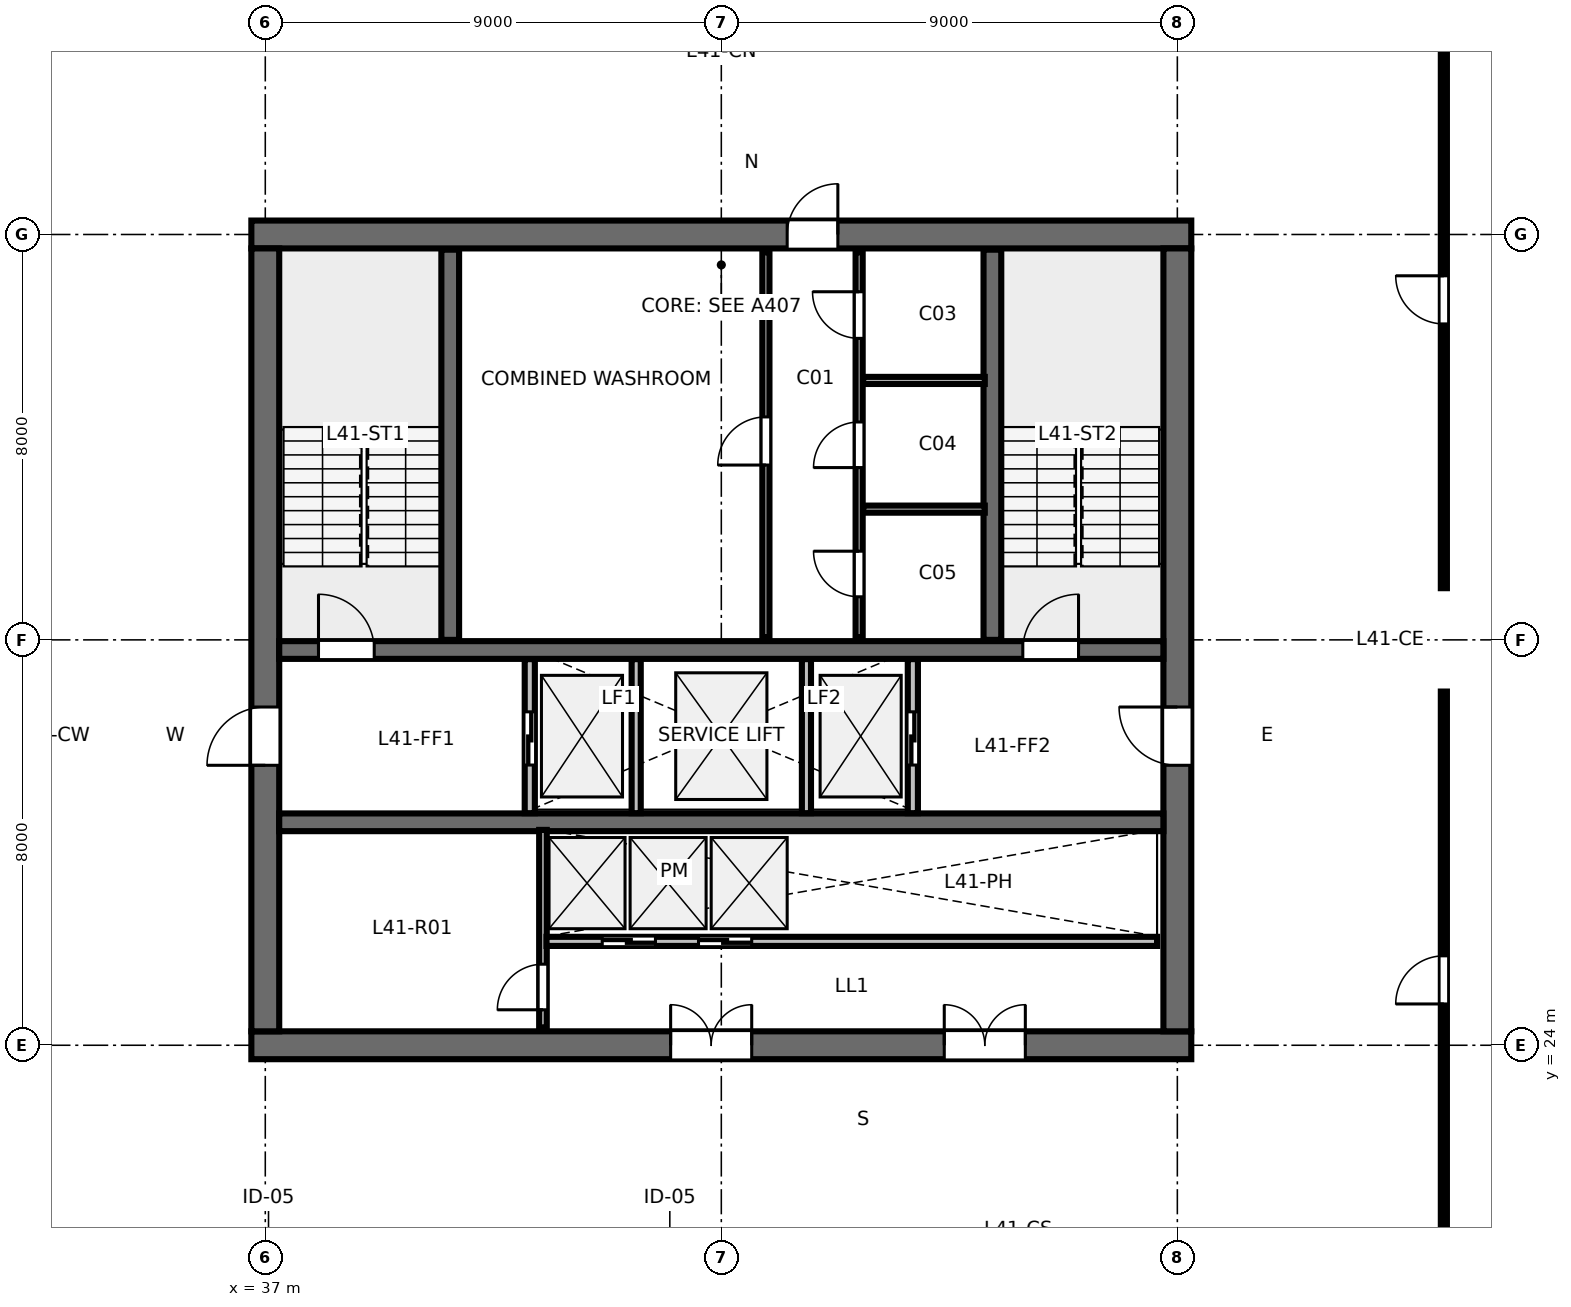
"""IFC4 building model, lengths in metres.
Left out: names, types, materials, properties, quantities, classifications, styles, units other than length and angle.
Written with IfcOpenShell. Run it as: python <this file> out.ifc"""

import sys

from ifc_helpers import new_model, si_unit, direction, frame, frame_2d, origin, place, context, subcontext, project, spatial, rectangle, extrude, element, fill, save


model = new_model("IFC4")
c1 = context("Model", 3, precision=1e-05, world=origin(), true_north=direction((0.0, 1.0)))
c2 = subcontext(c1, "Body", "Model", "MODEL_VIEW")
j1 = project(units=[si_unit("LENGTHUNIT", "METRE"), si_unit("PLANEANGLEUNIT", "RADIAN")], contexts=[c1])
p1 = place(None, origin())
s1 = spatial("IfcSite", under=j1, at=p1, CompositionType="ELEMENT")
p2 = place(p1, origin())
s2 = spatial("IfcBuilding", under=s1, at=p2, CompositionType="ELEMENT")
p3 = place(p2, frame((0.0, 0.0, 156.4)))
s3 = spatial("IfcBuildingStorey", under=s2, at=p3, CompositionType="ELEMENT", Elevation=156.4)
p4 = place(p3, frame((36.725, 24.0, 0.0), z_axis=(0.0, 0.0, 1.0), x_axis=(1.0, 0.0, 0.0)))
e1 = element("IfcWall", 1, at=p4, inside=s3, PredefinedType="SHEAR", context=c2, shape_type="SweptSolid", body=[
    extrude(rectangle(XDim=18.55, YDim=0.55, at=frame_2d((9.275, 0.0))), origin(), (0.0, 0.0, 1.0), 3.36),
])
p5 = place(p4, frame((8.275, 0.0, 0.0)))
e2 = element("IfcOpeningElement", 2, at=p5, cuts=e1, PredefinedType="OPENING", context=c2, shape_type="SweptSolid", body=[
    extrude(rectangle(XDim=1.6, YDim=2.15, at=frame_2d((0.8, 1.075))), frame((0.0, 0.285, 0.0), z_axis=(0.0, -1.0, 0.0), x_axis=(1.0, 0.0, 0.0)), (0.0, 0.0, 1.0), 0.57),
])
p6 = place(p4, frame((13.675, 0.0, 0.0)))
e3 = element("IfcOpeningElement", 3, at=p6, cuts=e1, PredefinedType="OPENING", context=c2, shape_type="SweptSolid", body=[
    extrude(rectangle(XDim=1.6, YDim=2.15, at=frame_2d((0.8, 1.075))), frame((0.0, 0.285, 0.0), z_axis=(0.0, -1.0, 0.0), x_axis=(1.0, 0.0, 0.0)), (0.0, 0.0, 1.0), 0.57),
])
p7 = place(p3, frame((36.725, 40.0, 0.0), z_axis=(0.0, 0.0, 1.0), x_axis=(1.0, 0.0, 0.0)))
e4 = element("IfcWall", 4, at=p7, inside=s3, PredefinedType="SHEAR", context=c2, shape_type="SweptSolid", body=[
    extrude(rectangle(XDim=18.55, YDim=0.55, at=frame_2d((9.275, 0.0))), origin(), (0.0, 0.0, 1.0), 3.36),
])
p8 = place(p7, frame((10.575, 0.0, 0.0)))
e5 = element("IfcOpeningElement", 5, at=p8, cuts=e4, PredefinedType="OPENING", context=c2, shape_type="SweptSolid", body=[
    extrude(rectangle(XDim=1.0, YDim=2.15, at=frame_2d((0.5, 1.075))), frame((0.0, 0.285, 0.0), z_axis=(0.0, -1.0, 0.0), x_axis=(1.0, 0.0, 0.0)), (0.0, 0.0, 1.0), 0.57),
])
p9 = place(p3, frame((37.0, 24.275, 0.0), z_axis=(0.0, 0.0, 1.0), x_axis=(0.0, 1.0, 0.0)))
e6 = element("IfcWall", 6, at=p9, inside=s3, PredefinedType="SHEAR", context=c2, shape_type="SweptSolid", body=[
    extrude(rectangle(XDim=15.45, YDim=0.55, at=frame_2d((7.725, 0.0))), origin(), (0.0, 0.0, 1.0), 3.36),
])
p10 = place(p9, frame((5.25, 0.0, 0.0)))
e7 = element("IfcOpeningElement", 7, at=p10, cuts=e6, PredefinedType="OPENING", context=c2, shape_type="SweptSolid", body=[
    extrude(rectangle(XDim=1.15, YDim=2.15, at=frame_2d((0.575, 1.075))), frame((0.0, 0.285, 0.0), z_axis=(0.0, -1.0, 0.0), x_axis=(1.0, 0.0, 0.0)), (0.0, 0.0, 1.0), 0.57),
])
p11 = place(p3, frame((55.0, 24.275, 0.0), z_axis=(0.0, 0.0, 1.0), x_axis=(0.0, 1.0, 0.0)))
e8 = element("IfcWall", 8, at=p11, inside=s3, PredefinedType="SHEAR", context=c2, shape_type="SweptSolid", body=[
    extrude(rectangle(XDim=15.45, YDim=0.55, at=frame_2d((7.725, 0.0))), origin(), (0.0, 0.0, 1.0), 3.36),
])
p12 = place(p11, frame((5.25, 0.0, 0.0)))
e9 = element("IfcOpeningElement", 9, at=p12, cuts=e8, PredefinedType="OPENING", context=c2, shape_type="SweptSolid", body=[
    extrude(rectangle(XDim=1.15, YDim=2.15, at=frame_2d((0.575, 1.075))), frame((0.0, 0.285, 0.0), z_axis=(0.0, -1.0, 0.0), x_axis=(1.0, 0.0, 0.0)), (0.0, 0.0, 1.0), 0.57),
])
p13 = place(p3, frame((37.275, 31.8, 0.0), z_axis=(0.0, 0.0, 1.0), x_axis=(1.0, 0.0, 0.0)))
e10 = element("IfcWall", 10, at=p13, inside=s3, PredefinedType="SHEAR", context=c2, shape_type="SweptSolid", body=[
    extrude(rectangle(XDim=17.45, YDim=0.35, at=frame_2d((8.725, 0.0))), origin(), (0.0, 0.0, 1.0), 3.36),
])
p14 = place(p13, frame((0.775, 0.0, 0.0)))
e11 = element("IfcOpeningElement", 11, at=p14, cuts=e10, PredefinedType="OPENING", context=c2, shape_type="SweptSolid", body=[
    extrude(rectangle(XDim=1.1, YDim=2.15, at=frame_2d((0.55, 1.075))), frame((0.0, 0.185, 0.0), z_axis=(0.0, -1.0, 0.0), x_axis=(1.0, 0.0, 0.0)), (0.0, 0.0, 1.0), 0.37),
])
p15 = place(p13, frame((14.675, 0.0, 0.0)))
e12 = element("IfcOpeningElement", 12, at=p15, cuts=e10, PredefinedType="OPENING", context=c2, shape_type="SweptSolid", body=[
    extrude(rectangle(XDim=1.1, YDim=2.15, at=frame_2d((0.55, 1.075))), frame((0.0, 0.185, 0.0), z_axis=(0.0, -1.0, 0.0), x_axis=(1.0, 0.0, 0.0)), (0.0, 0.0, 1.0), 0.37),
])
p16 = place(p3, frame((37.275, 28.4, 0.0), z_axis=(0.0, 0.0, 1.0), x_axis=(1.0, 0.0, 0.0)))
e13 = element("IfcWall", 13, at=p16, inside=s3, PredefinedType="SHEAR", context=c2, shape_type="SweptSolid", body=[
    extrude(rectangle(XDim=17.45, YDim=0.35, at=frame_2d((8.725, 0.0))), origin(), (0.0, 0.0, 1.0), 3.36),
])
for number, where, z_axis, x_axis in (
    (14, (40.65, 32.0, 0.0), (0.0, 0.0, 1.0), (0.0, 1.0, 0.0)),
    (15, (51.35, 32.0, 0.0), (0.0, 0.0, 1.0), (0.0, 1.0, 0.0)),
):
    element("IfcWall", number, at=place(p3, frame(where, z_axis=z_axis, x_axis=x_axis)), inside=s3, PredefinedType="SHEAR", context=c2, shape_type="SweptSolid", body=[
        extrude(rectangle(XDim=7.7, YDim=0.35, at=frame_2d((3.85, 0.0))), origin(), (0.0, 0.0, 1.0), 3.6),
    ])
p17 = place(p3, frame((46.88, 32.05, 0.0), z_axis=(0.0, 0.0, 1.0), x_axis=(0.0, 1.0, 0.0)))
e16 = element("IfcWall", 16, at=p17, inside=s3, PredefinedType="PARTITIONING", context=c2, shape_type="SweptSolid", body=[
    extrude(rectangle(XDim=7.6, YDim=0.14, at=frame_2d((3.8, 0.0))), origin(), (0.0, 0.0, 1.0), 3.36),
])
p18 = place(p17, frame((3.4, 0.0, 0.0)))
e17 = element("IfcOpeningElement", 17, at=p18, cuts=e16, PredefinedType="OPENING", context=c2, shape_type="SweptSolid", body=[
    extrude(rectangle(XDim=0.95, YDim=2.15, at=frame_2d((0.475, 1.075))), frame((0.0, 0.08, 0.0), z_axis=(0.0, -1.0, 0.0), x_axis=(1.0, 0.0, 0.0)), (0.0, 0.0, 1.0), 0.16),
])
p19 = place(p3, frame((48.72, 32.05, 0.0), z_axis=(0.0, 0.0, 1.0), x_axis=(0.0, 1.0, 0.0)))
e18 = element("IfcWall", 18, at=p19, inside=s3, PredefinedType="PARTITIONING", context=c2, shape_type="SweptSolid", body=[
    extrude(rectangle(XDim=7.6, YDim=0.14, at=frame_2d((3.8, 0.0))), origin(), (0.0, 0.0, 1.0), 3.36),
])
p20 = place(p19, frame((0.8, 0.0, 0.0)))
e19 = element("IfcOpeningElement", 19, at=p20, cuts=e18, PredefinedType="OPENING", context=c2, shape_type="SweptSolid", body=[
    extrude(rectangle(XDim=0.9, YDim=2.15, at=frame_2d((0.45, 1.075))), frame((0.0, 0.08, 0.0), z_axis=(0.0, -1.0, 0.0), x_axis=(1.0, 0.0, 0.0)), (0.0, 0.0, 1.0), 0.16),
])
p21 = place(p19, frame((3.35, 0.0, 0.0)))
e20 = element("IfcOpeningElement", 20, at=p21, cuts=e18, PredefinedType="OPENING", context=c2, shape_type="SweptSolid", body=[
    extrude(rectangle(XDim=0.9, YDim=2.15, at=frame_2d((0.45, 1.075))), frame((0.0, 0.08, 0.0), z_axis=(0.0, -1.0, 0.0), x_axis=(1.0, 0.0, 0.0)), (0.0, 0.0, 1.0), 0.16),
])
p22 = place(p19, frame((5.9, 0.0, 0.0)))
e21 = element("IfcOpeningElement", 21, at=p22, cuts=e18, PredefinedType="OPENING", context=c2, shape_type="SweptSolid", body=[
    extrude(rectangle(XDim=0.92, YDim=2.15, at=frame_2d((0.46, 1.075))), frame((0.0, 0.08, 0.0), z_axis=(0.0, -1.0, 0.0), x_axis=(1.0, 0.0, 0.0)), (0.0, 0.0, 1.0), 0.16),
])
for number, where, z_axis, x_axis in (
    (22, (48.8, 34.58, 0.0), (0.0, 0.0, 1.0), (1.0, 0.0, 0.0)),
    (23, (48.8, 37.12, 0.0), (0.0, 0.0, 1.0), (1.0, 0.0, 0.0)),
):
    element("IfcWall", number, at=place(p3, frame(where, z_axis=z_axis, x_axis=x_axis)), inside=s3, PredefinedType="PARTITIONING", context=c2, shape_type="SweptSolid", body=[
        extrude(rectangle(XDim=2.4, YDim=0.14, at=frame_2d((1.2, 0.0))), origin(), (0.0, 0.0, 1.0), 3.36),
    ])
p23 = place(p3, frame((42.22, 28.58, 0.0), z_axis=(0.0, 0.0, 1.0), x_axis=(0.0, 1.0, 0.0)))
e24 = element("IfcWall", 24, at=p23, inside=s3, PredefinedType="PARTITIONING", context=c2, shape_type="SweptSolid", body=[
    extrude(rectangle(XDim=3.04, YDim=0.2, at=frame_2d((1.52, 0.0))), origin(), (0.0, 0.0, 1.0), 3.36),
])
p24 = place(p23, frame((0.95, 0.0, 0.0)))
e25 = element("IfcOpeningElement", 25, at=p24, cuts=e24, PredefinedType="OPENING", context=c2, shape_type="SweptSolid", body=[
    extrude(rectangle(XDim=1.05, YDim=2.15, at=frame_2d((0.525, 1.075))), frame((0.0, 0.11, 0.0), z_axis=(0.0, -1.0, 0.0), x_axis=(1.0, 0.0, 0.0)), (0.0, 0.0, 1.0), 0.22),
])
p25 = place(p3, frame((49.78, 28.58, 0.0), z_axis=(0.0, 0.0, 1.0), x_axis=(0.0, 1.0, 0.0)))
e26 = element("IfcWall", 26, at=p25, inside=s3, PredefinedType="PARTITIONING", context=c2, shape_type="SweptSolid", body=[
    extrude(rectangle(XDim=3.04, YDim=0.2, at=frame_2d((1.52, 0.0))), origin(), (0.0, 0.0, 1.0), 3.36),
])
p26 = place(p25, frame((0.95, 0.0, 0.0)))
e27 = element("IfcOpeningElement", 27, at=p26, cuts=e26, PredefinedType="OPENING", context=c2, shape_type="SweptSolid", body=[
    extrude(rectangle(XDim=1.05, YDim=2.15, at=frame_2d((0.525, 1.075))), frame((0.0, 0.11, 0.0), z_axis=(0.0, -1.0, 0.0), x_axis=(1.0, 0.0, 0.0)), (0.0, 0.0, 1.0), 0.22),
])
for number, where, z_axis, x_axis in (
    (28, (44.32, 28.58, 0.0), (0.0, 0.0, 1.0), (0.0, 1.0, 0.0)),
    (29, (47.68, 28.58, 0.0), (0.0, 0.0, 1.0), (0.0, 1.0, 0.0)),
):
    element("IfcWall", number, at=place(p3, frame(where, z_axis=z_axis, x_axis=x_axis)), inside=s3, PredefinedType="PARTITIONING", context=c2, shape_type="SweptSolid", body=[
        extrude(rectangle(XDim=3.04, YDim=0.18, at=frame_2d((1.52, 0.0))), origin(), (0.0, 0.0, 1.0), 3.36),
    ])
p27 = place(p3, frame((42.48, 24.35, 0.0), z_axis=(0.0, 0.0, 1.0), x_axis=(0.0, 1.0, 0.0)))
e30 = element("IfcWall", 30, at=p27, inside=s3, PredefinedType="PARTITIONING", context=c2, shape_type="SweptSolid", body=[
    extrude(rectangle(XDim=3.9, YDim=0.15, at=frame_2d((1.95, 0.0))), origin(), (0.0, 0.0, 1.0), 3.36),
])
p28 = place(p27, frame((0.35, 0.0, 0.0)))
e31 = element("IfcOpeningElement", 31, at=p28, cuts=e30, PredefinedType="OPENING", context=c2, shape_type="SweptSolid", body=[
    extrude(rectangle(XDim=0.9, YDim=2.15, at=frame_2d((0.45, 1.075))), frame((0.0, 0.085, 0.0), z_axis=(0.0, -1.0, 0.0), x_axis=(1.0, 0.0, 0.0)), (0.0, 0.0, 1.0), 0.17),
])
p29 = place(p3, frame((42.55, 26.05, 0.0), z_axis=(0.0, 0.0, 1.0), x_axis=(1.0, 0.0, 0.0)))
e32 = element("IfcWall", 32, at=p29, inside=s3, PredefinedType="PARTITIONING", context=c2, shape_type="SweptSolid", body=[
    extrude(rectangle(XDim=12.05, YDim=0.18, at=frame_2d((6.025, 0.0))), origin(), (0.0, 0.0, 1.0), 3.36),
])
p30 = place(p29, frame((1.1, 0.0, 0.0)))
e33 = element("IfcOpeningElement", 33, at=p30, cuts=e32, PredefinedType="OPENING", context=c2, shape_type="SweptSolid", body=[
    extrude(rectangle(XDim=1.05, YDim=2.15, at=frame_2d((0.525, 1.075))), frame((0.0, 0.1, 0.0), z_axis=(0.0, -1.0, 0.0), x_axis=(1.0, 0.0, 0.0)), (0.0, 0.0, 1.0), 0.2),
])
p31 = place(p29, frame((3.0, 0.0, 0.0)))
e34 = element("IfcOpeningElement", 34, at=p31, cuts=e32, PredefinedType="OPENING", context=c2, shape_type="SweptSolid", body=[
    extrude(rectangle(XDim=1.05, YDim=2.15, at=frame_2d((0.525, 1.075))), frame((0.0, 0.1, 0.0), z_axis=(0.0, -1.0, 0.0), x_axis=(1.0, 0.0, 0.0)), (0.0, 0.0, 1.0), 0.2),
])
p32 = place(p3, frame((60.26, 19.4, 0.0), z_axis=(0.0, 0.0, 1.0), x_axis=(0.0, 1.0, 0.0)))
e35 = element("IfcWall", 35, at=p32, inside=s3, PredefinedType="PARTITIONING", context=c2, shape_type="SweptSolid", body=[
    extrude(rectangle(XDim=11.58, YDim=0.12, at=frame_2d((5.79, 0.0))), origin(), (0.0, 0.0, 1.0), 2.64),
])
p33 = place(p32, frame((5.415, 0.0, 0.0)))
e36 = element("IfcOpeningElement", 36, at=p33, cuts=e35, PredefinedType="OPENING", context=c2, shape_type="SweptSolid", body=[
    extrude(rectangle(XDim=0.95, YDim=2.15, at=frame_2d((0.475, 1.075))), frame((0.0, 0.07, 0.0), z_axis=(0.0, -1.0, 0.0), x_axis=(1.0, 0.0, 0.0)), (0.0, 0.0, 1.0), 0.14),
])
p34 = place(p3, frame((60.26, 33.02, 0.0), z_axis=(0.0, 0.0, 1.0), x_axis=(0.0, 1.0, 0.0)))
e37 = element("IfcWall", 37, at=p34, inside=s3, PredefinedType="PARTITIONING", context=c2, shape_type="SweptSolid", body=[
    extrude(rectangle(XDim=11.58, YDim=0.12, at=frame_2d((5.79, 0.0))), origin(), (0.0, 0.0, 1.0), 2.64),
])
p35 = place(p34, frame((5.215, 0.0, 0.0)))
e38 = element("IfcOpeningElement", 38, at=p35, cuts=e37, PredefinedType="OPENING", context=c2, shape_type="SweptSolid", body=[
    extrude(rectangle(XDim=0.95, YDim=2.15, at=frame_2d((0.475, 1.075))), frame((0.0, 0.07, 0.0), z_axis=(0.0, -1.0, 0.0), x_axis=(1.0, 0.0, 0.0)), (0.0, 0.0, 1.0), 0.14),
])
p36 = place(p14, origin())
e39 = element("IfcDoor", 39, at=p36, inside=s3, OperationType="SINGLE_SWING_LEFT", PredefinedType="DOOR", context=c2, shape_type="SweptSolid", body=[
    extrude(rectangle(XDim=1.1, YDim=2.15, at=frame_2d((0.55, 1.075))), frame((0.0, 0.025, 0.0), z_axis=(0.0, -1.0, 0.0), x_axis=(1.0, 0.0, 0.0)), (0.0, 0.0, 1.0), 0.05),
])
fill(e11, e39)
p37 = place(p15, origin())
e40 = element("IfcDoor", 40, at=p37, inside=s3, OperationType="SINGLE_SWING_RIGHT", PredefinedType="DOOR", context=c2, shape_type="SweptSolid", body=[
    extrude(rectangle(XDim=1.1, YDim=2.15, at=frame_2d((0.55, 1.075))), frame((0.0, 0.025, 0.0), z_axis=(0.0, -1.0, 0.0), x_axis=(1.0, 0.0, 0.0)), (0.0, 0.0, 1.0), 0.05),
])
fill(e12, e40)
p38 = place(p8, origin())
e41 = element("IfcDoor", 41, at=p38, inside=s3, OperationType="SINGLE_SWING_RIGHT", PredefinedType="DOOR", context=c2, shape_type="SweptSolid", body=[
    extrude(rectangle(XDim=1.0, YDim=2.15, at=frame_2d((0.5, 1.075))), frame((0.0, 0.025, 0.0), z_axis=(0.0, -1.0, 0.0), x_axis=(1.0, 0.0, 0.0)), (0.0, 0.0, 1.0), 0.05),
])
fill(e5, e41)
p39 = place(p10, origin())
e42 = element("IfcDoor", 42, at=p39, inside=s3, OperationType="SINGLE_SWING_LEFT", PredefinedType="DOOR", context=c2, shape_type="SweptSolid", body=[
    extrude(rectangle(XDim=1.15, YDim=2.15, at=frame_2d((0.575, 1.075))), frame((0.0, 0.025, 0.0), z_axis=(0.0, -1.0, 0.0), x_axis=(1.0, 0.0, 0.0)), (0.0, 0.0, 1.0), 0.05),
])
fill(e7, e42)
p40 = place(p12, origin())
e43 = element("IfcDoor", 43, at=p40, inside=s3, OperationType="SINGLE_SWING_RIGHT", PredefinedType="DOOR", context=c2, shape_type="SweptSolid", body=[
    extrude(rectangle(XDim=1.15, YDim=2.15, at=frame_2d((0.575, 1.075))), frame((0.0, 0.025, 0.0), z_axis=(0.0, -1.0, 0.0), x_axis=(1.0, 0.0, 0.0)), (0.0, 0.0, 1.0), 0.05),
])
fill(e9, e43)
p41 = place(p5, origin())
e44 = element("IfcDoor", 44, at=p41, inside=s3, OperationType="DOUBLE_DOOR_SINGLE_SWING", PredefinedType="DOOR", context=c2, shape_type="SweptSolid", body=[
    extrude(rectangle(XDim=1.6, YDim=2.15, at=frame_2d((0.8, 1.075))), frame((0.0, 0.025, 0.0), z_axis=(0.0, -1.0, 0.0), x_axis=(1.0, 0.0, 0.0)), (0.0, 0.0, 1.0), 0.05),
])
fill(e2, e44)
p42 = place(p6, origin())
e45 = element("IfcDoor", 45, at=p42, inside=s3, OperationType="DOUBLE_DOOR_SINGLE_SWING", PredefinedType="DOOR", context=c2, shape_type="SweptSolid", body=[
    extrude(rectangle(XDim=1.6, YDim=2.15, at=frame_2d((0.8, 1.075))), frame((0.0, 0.025, 0.0), z_axis=(0.0, -1.0, 0.0), x_axis=(1.0, 0.0, 0.0)), (0.0, 0.0, 1.0), 0.05),
])
fill(e3, e45)
p43 = place(p18, origin())
e46 = element("IfcDoor", 46, at=p43, inside=s3, OperationType="SINGLE_SWING_LEFT", PredefinedType="DOOR", context=c2, shape_type="SweptSolid", body=[
    extrude(rectangle(XDim=0.95, YDim=2.15, at=frame_2d((0.475, 1.075))), frame((0.0, 0.025, 0.0), z_axis=(0.0, -1.0, 0.0), x_axis=(1.0, 0.0, 0.0)), (0.0, 0.0, 1.0), 0.05),
])
fill(e17, e46)
p44 = place(p20, origin())
e47 = element("IfcDoor", 47, at=p44, inside=s3, OperationType="SINGLE_SWING_RIGHT", PredefinedType="DOOR", context=c2, shape_type="SweptSolid", body=[
    extrude(rectangle(XDim=0.9, YDim=2.15, at=frame_2d((0.45, 1.075))), frame((0.0, 0.025, 0.0), z_axis=(0.0, -1.0, 0.0), x_axis=(1.0, 0.0, 0.0)), (0.0, 0.0, 1.0), 0.05),
])
fill(e19, e47)
p45 = place(p21, origin())
e48 = element("IfcDoor", 48, at=p45, inside=s3, OperationType="SINGLE_SWING_LEFT", PredefinedType="DOOR", context=c2, shape_type="SweptSolid", body=[
    extrude(rectangle(XDim=0.9, YDim=2.15, at=frame_2d((0.45, 1.075))), frame((0.0, 0.025, 0.0), z_axis=(0.0, -1.0, 0.0), x_axis=(1.0, 0.0, 0.0)), (0.0, 0.0, 1.0), 0.05),
])
fill(e20, e48)
p46 = place(p22, origin())
e49 = element("IfcDoor", 49, at=p46, inside=s3, OperationType="SINGLE_SWING_RIGHT", PredefinedType="DOOR", context=c2, shape_type="SweptSolid", body=[
    extrude(rectangle(XDim=0.92, YDim=2.15, at=frame_2d((0.46, 1.075))), frame((0.0, 0.025, 0.0), z_axis=(0.0, -1.0, 0.0), x_axis=(1.0, 0.0, 0.0)), (0.0, 0.0, 1.0), 0.05),
])
fill(e21, e49)
p47 = place(p24, origin())
e50 = element("IfcDoor", 50, at=p47, inside=s3, OperationType="SLIDING_TO_LEFT", PredefinedType="DOOR", context=c2, shape_type="SweptSolid", body=[
    extrude(rectangle(XDim=1.05, YDim=2.15, at=frame_2d((0.525, 1.075))), frame((0.0, 0.025, 0.0), z_axis=(0.0, -1.0, 0.0), x_axis=(1.0, 0.0, 0.0)), (0.0, 0.0, 1.0), 0.05),
])
fill(e25, e50)
p48 = place(p26, origin())
e51 = element("IfcDoor", 51, at=p48, inside=s3, OperationType="SLIDING_TO_RIGHT", PredefinedType="DOOR", context=c2, shape_type="SweptSolid", body=[
    extrude(rectangle(XDim=1.05, YDim=2.15, at=frame_2d((0.525, 1.075))), frame((0.0, 0.025, 0.0), z_axis=(0.0, -1.0, 0.0), x_axis=(1.0, 0.0, 0.0)), (0.0, 0.0, 1.0), 0.05),
])
fill(e27, e51)
p49 = place(p28, origin())
e52 = element("IfcDoor", 52, at=p49, inside=s3, OperationType="SINGLE_SWING_LEFT", PredefinedType="DOOR", context=c2, shape_type="SweptSolid", body=[
    extrude(rectangle(XDim=0.9, YDim=2.15, at=frame_2d((0.45, 1.075))), frame((0.0, 0.025, 0.0), z_axis=(0.0, -1.0, 0.0), x_axis=(1.0, 0.0, 0.0)), (0.0, 0.0, 1.0), 0.05),
])
fill(e31, e52)
p50 = place(p30, origin())
e53 = element("IfcDoor", 53, at=p50, inside=s3, OperationType="SLIDING_TO_LEFT", PredefinedType="DOOR", context=c2, shape_type="SweptSolid", body=[
    extrude(rectangle(XDim=1.05, YDim=2.15, at=frame_2d((0.525, 1.075))), frame((0.0, 0.025, 0.0), z_axis=(0.0, -1.0, 0.0), x_axis=(1.0, 0.0, 0.0)), (0.0, 0.0, 1.0), 0.05),
])
fill(e33, e53)
p51 = place(p31, origin())
e54 = element("IfcDoor", 54, at=p51, inside=s3, OperationType="SLIDING_TO_RIGHT", PredefinedType="DOOR", context=c2, shape_type="SweptSolid", body=[
    extrude(rectangle(XDim=1.05, YDim=2.15, at=frame_2d((0.525, 1.075))), frame((0.0, 0.025, 0.0), z_axis=(0.0, -1.0, 0.0), x_axis=(1.0, 0.0, 0.0)), (0.0, 0.0, 1.0), 0.05),
])
fill(e34, e54)
p52 = place(p33, origin())
e55 = element("IfcDoor", 55, at=p52, inside=s3, OperationType="SINGLE_SWING_LEFT", PredefinedType="DOOR", context=c2, shape_type="SweptSolid", body=[
    extrude(rectangle(XDim=0.95, YDim=2.15, at=frame_2d((0.475, 1.075))), frame((0.0, 0.025, 0.0), z_axis=(0.0, -1.0, 0.0), x_axis=(1.0, 0.0, 0.0)), (0.0, 0.0, 1.0), 0.05),
])
fill(e36, e55)
p53 = place(p35, origin())
e56 = element("IfcDoor", 56, at=p53, inside=s3, OperationType="SINGLE_SWING_RIGHT", PredefinedType="DOOR", context=c2, shape_type="SweptSolid", body=[
    extrude(rectangle(XDim=0.95, YDim=2.15, at=frame_2d((0.475, 1.075))), frame((0.0, 0.025, 0.0), z_axis=(0.0, -1.0, 0.0), x_axis=(1.0, 0.0, 0.0)), (0.0, 0.0, 1.0), 0.05),
])
fill(e38, e56)
save(model, sys.argv[1])
